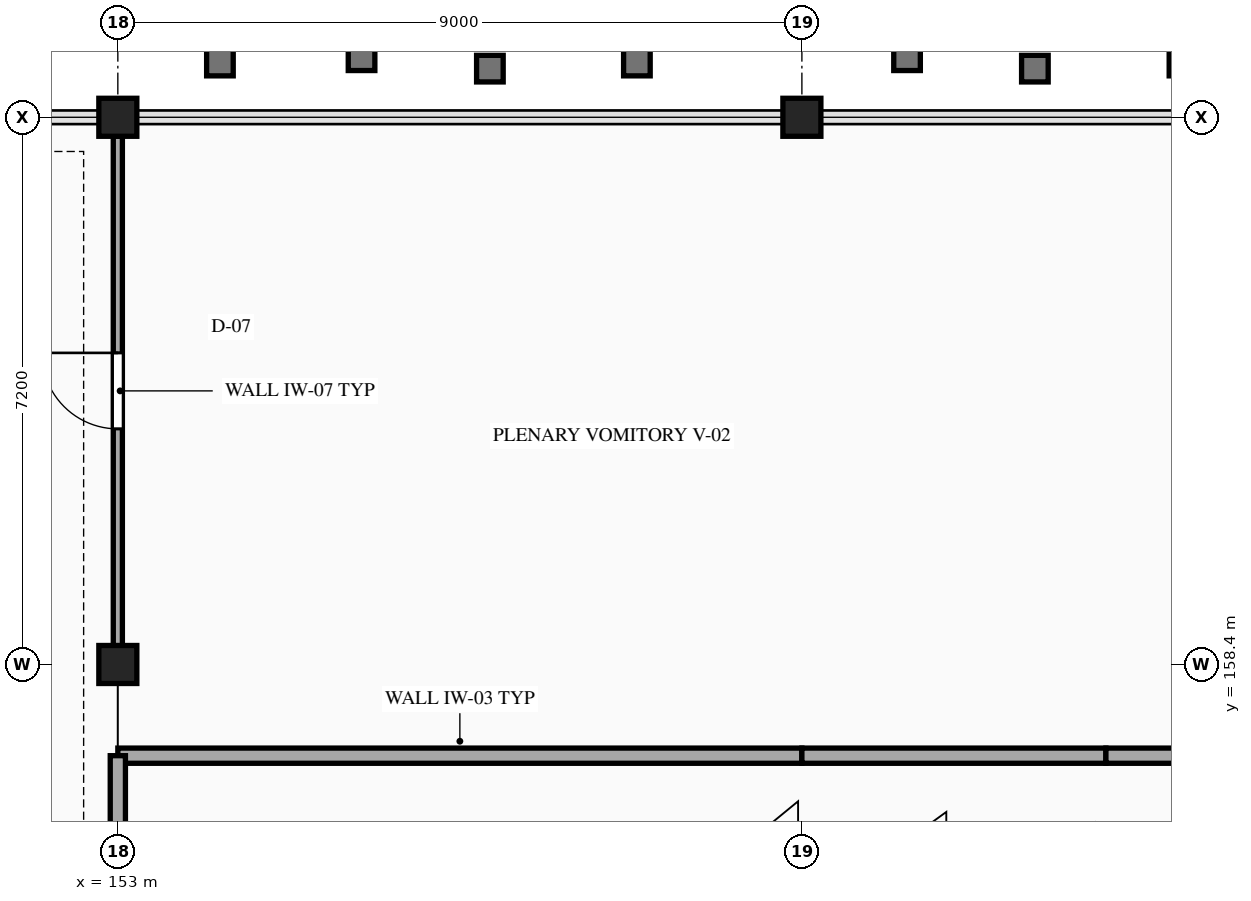
"""IFC4 building model, lengths in metres.
Left out: names, types, materials, properties, quantities, classifications, styles, units other than length and angle.
Written with IfcOpenShell. Run it as: python <this file> out.ifc"""

import sys

from ifc_helpers import new_model, si_unit, direction, frame, frame_2d, origin, origin_2d, place, context, subcontext, project, spatial, rectangle, hollow_rectangle, extrude, element, fill, save


model = new_model("IFC4")
c1 = context("Model", 3, precision=1e-05, world=origin(), true_north=direction((0.0, 1.0)))
c2 = subcontext(c1, "Body", "Model", "MODEL_VIEW")
j1 = project(units=[si_unit("LENGTHUNIT", "METRE"), si_unit("PLANEANGLEUNIT", "RADIAN")], contexts=[c1])
p1 = place(None, origin())
s1 = spatial("IfcSite", under=j1, at=p1, CompositionType="ELEMENT")
p2 = place(p1, origin())
s2 = spatial("IfcBuilding", under=s1, at=p2, CompositionType="ELEMENT")
p3 = place(p2, frame((0.0, 0.0, 5.4)))
s3 = spatial("IfcBuildingStorey", under=s2, at=p3, CompositionType="ELEMENT", Elevation=5.4)
for number, where, z_axis, x_axis in (
    (1, (153.0, 158.4, 0.0), (0.0, 0.0, 1.0), (1.0, 0.0, 0.0)),
    (2, (153.0, 165.6, 0.0), (0.0, 0.0, 1.0), (1.0, 0.0, 0.0)),
    (3, (162.0, 165.6, 0.0), (0.0, 0.0, 1.0), (1.0, 0.0, 0.0)),
):
    element("IfcColumn", number, at=place(p3, frame(where, z_axis=z_axis, x_axis=x_axis)), inside=s3, PredefinedType="COLUMN", context=c2, shape_type="SweptSolid", body=[
        extrude(hollow_rectangle(XDim=0.5, YDim=0.5, WallThickness=0.02, at=origin_2d()), origin(), (0.0, 0.0, 1.0), 5.4),
    ])
p4 = place(p3, frame((153.0, 157.2, 0.0), z_axis=(0.0, 0.0, 1.0), x_axis=(1.0, 0.0, 0.0)))
e4 = element("IfcWall", 4, at=p4, inside=s3, PredefinedType="PARTITIONING", context=c2, shape_type="SweptSolid", body=[
    extrude(rectangle(XDim=9.0, YDim=0.2, at=frame_2d((4.5, 0.0))), origin(), (0.0, 0.0, 1.0), 4.368),
])
p5 = place(p3, frame((162.0, 157.2, 0.0), z_axis=(0.0, 0.0, 1.0), x_axis=(1.0, 0.0, 0.0)))
e5 = element("IfcWall", 5, at=p5, inside=s3, PredefinedType="PARTITIONING", context=c2, shape_type="SweptSolid", body=[
    extrude(rectangle(XDim=4.0, YDim=0.2, at=frame_2d((2.0, 0.0))), origin(), (0.0, 0.0, 1.0), 4.98),
])
p6 = place(p3, frame((166.0, 157.2, 0.0), z_axis=(0.0, 0.0, 1.0), x_axis=(1.0, 0.0, 0.0)))
e6 = element("IfcWall", 6, at=p6, inside=s3, PredefinedType="PARTITIONING", context=c2, shape_type="SweptSolid", body=[
    extrude(rectangle(XDim=5.0, YDim=0.2, at=frame_2d((2.5, 0.0))), origin(), (0.0, 0.0, 1.0), 4.98),
])
p7 = place(p3, frame((153.0, 151.448, 0.0), z_axis=(0.0, 0.0, 1.0), x_axis=(0.0, 1.0, 0.0)))
e7 = element("IfcWall", 7, at=p7, inside=s3, PredefinedType="PARTITIONING", context=c2, shape_type="SweptSolid", body=[
    extrude(rectangle(XDim=5.752, YDim=0.2, at=frame_2d((2.876, 0.0))), origin(), (0.0, 0.0, 1.0), 4.368),
])
p8 = place(p3, frame((153.0, 158.648, 0.0), z_axis=(0.0, 0.0, 1.0), x_axis=(0.0, 1.0, 0.0)))
e8 = element("IfcWall", 8, at=p8, inside=s3, PredefinedType="PARTITIONING", context=c2, shape_type="SweptSolid", body=[
    extrude(rectangle(XDim=6.704, YDim=0.12, at=frame_2d((3.352, 0.0))), origin(), (0.0, 0.0, 1.0), 4.368),
])
p9 = place(p8, frame((2.852, 0.0, 0.0)))
e9 = element("IfcOpeningElement", 9, at=p9, cuts=e8, PredefinedType="OPENING", context=c2, shape_type="SweptSolid", body=[
    extrude(rectangle(XDim=1.0, YDim=2.15, at=frame_2d((0.5, 1.075))), frame((0.0, 0.07, 0.0), z_axis=(0.0, -1.0, 0.0), x_axis=(1.0, 0.0, 0.0)), (0.0, 0.0, 1.0), 0.14),
])
p10 = place(p9, origin())
e10 = element("IfcDoor", 10, at=p10, inside=s3, OperationType="SINGLE_SWING_RIGHT", PredefinedType="DOOR", context=c2, shape_type="SweptSolid", body=[
    extrude(rectangle(XDim=1.0, YDim=2.15, at=frame_2d((0.5, 1.075))), frame((0.0, 0.025, 0.0), z_axis=(0.0, -1.0, 0.0), x_axis=(1.0, 0.0, 0.0)), (0.0, 0.0, 1.0), 0.05),
])
fill(e9, e10)
save(model, sys.argv[1])
